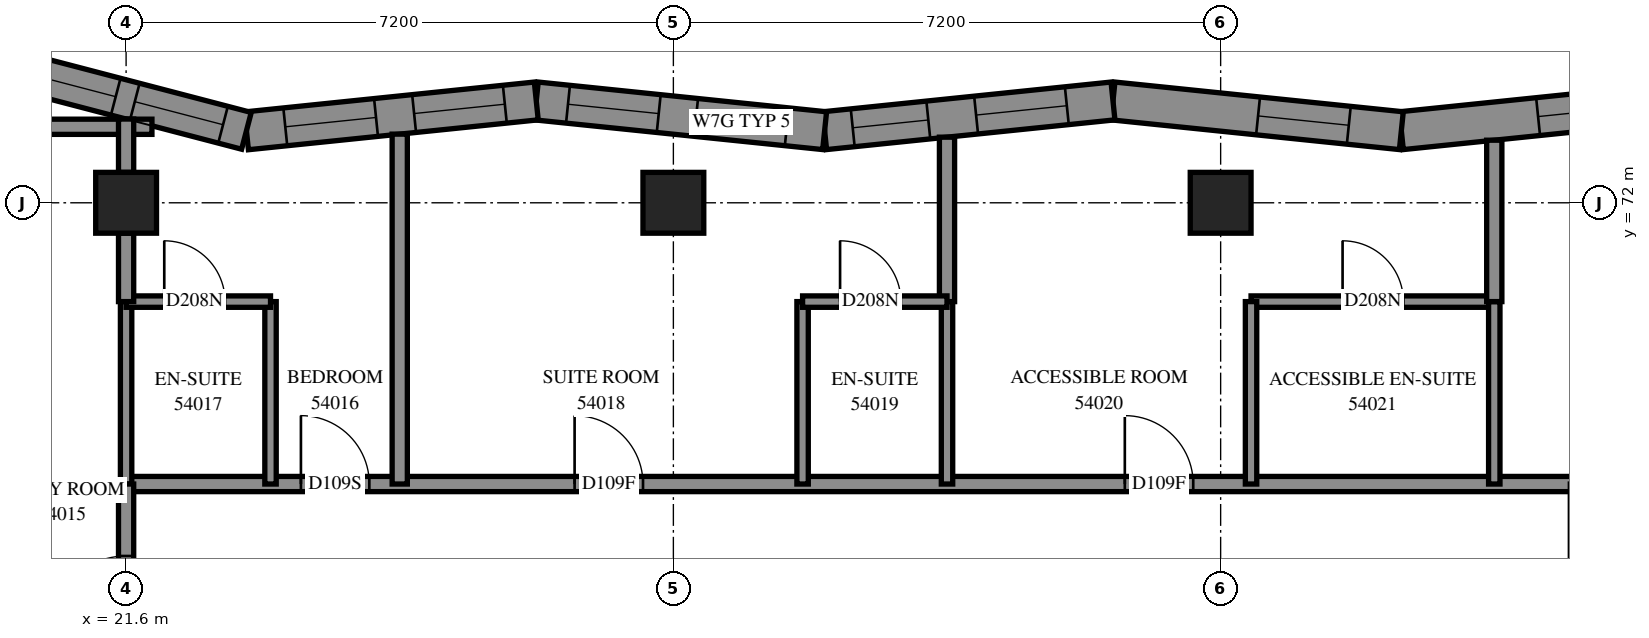
"""IFC4 building model, lengths in metres.
Left out: names, types, materials, properties, quantities, classifications, styles, units other than length and angle.
Written with IfcOpenShell. Run it as: python <this file> out.ifc"""

import sys

from ifc_helpers import new_model, si_unit, direction, frame, frame_2d, origin, origin_2d, place, context, subcontext, project, spatial, polyline, rectangle, outline, extrude, element, fill, save


model = new_model("IFC4")
c1 = context("Model", 3, precision=1e-05, world=origin(), true_north=direction((0.0, 1.0)))
c2 = subcontext(c1, "Body", "Model", "MODEL_VIEW")
j1 = project(units=[si_unit("LENGTHUNIT", "METRE"), si_unit("PLANEANGLEUNIT", "RADIAN")], contexts=[c1])
p1 = place(None, origin())
s1 = spatial("IfcSite", under=j1, at=p1, CompositionType="ELEMENT")
p2 = place(p1, origin())
s2 = spatial("IfcBuilding", under=s1, at=p2, CompositionType="ELEMENT")
p3 = place(p2, frame((0.0, 0.0, 199.8)))
s3 = spatial("IfcBuildingStorey", under=s2, at=p3, CompositionType="ELEMENT", Elevation=199.8)
for number, where, z_axis, x_axis in (
    (1, (21.6, 72.0, 0.0), (0.0, 0.0, 1.0), (1.0, 0.0, 0.0)),
    (2, (28.8, 72.0, 0.0), (0.0, 0.0, 1.0), (1.0, 0.0, 0.0)),
    (3, (36.0, 72.0, 0.0), (0.0, 0.0, 1.0), (1.0, 0.0, 0.0)),
):
    element("IfcColumn", number, at=place(p3, frame(where, z_axis=z_axis, x_axis=x_axis)), inside=s3, PredefinedType="COLUMN", context=c2, shape_type="SweptSolid", body=[
        extrude(rectangle(XDim=0.8, YDim=0.8, at=origin_2d()), origin(), (0.0, 0.0, 1.0), 3.1),
    ])
p4 = place(p3, frame((42.171, 73.34, 0.0), z_axis=(0.0, 0.0, 1.0), x_axis=(-0.9947306832, -0.1025225234, 0.0)))
e4 = element("IfcWall", 4, at=p4, inside=s3, PredefinedType="SOLIDWALL", context=c2, shape_type="SweptSolid", body=[
    extrude(outline(polyline([(-0.026, -0.25), (3.788, -0.25), (3.84, 0.25), (0.026, 0.25), (-0.026, -0.25)])), origin(), (0.0, 0.0, 1.0), 3.1),
])
p5 = place(p4, frame((0.805, 0.0, 0.45)))
e5 = element("IfcOpeningElement", 5, at=p5, cuts=e4, PredefinedType="OPENING", context=c2, shape_type="SweptSolid", body=[
    extrude(rectangle(XDim=1.2, YDim=2.5, at=frame_2d((0.6, 1.25))), frame((0.0, 0.26, 0.0), z_axis=(0.0, -1.0, 0.0), x_axis=(1.0, 0.0, 0.0)), (0.0, 0.0, 1.0), 0.52),
])
p6 = place(p3, frame((38.377, 72.949, 0.0), z_axis=(0.0, 0.0, 1.0), x_axis=(-0.9947306832, 0.1025225234, 0.0)))
e6 = element("IfcWall", 6, at=p6, inside=s3, PredefinedType="SOLIDWALL", context=c2, shape_type="SweptSolid", body=[
    extrude(outline(polyline([(0.026, -0.25), (3.84, -0.25), (3.788, 0.25), (-0.026, 0.25), (0.026, -0.25)])), origin(), (0.0, 0.0, 1.0), 3.1),
])
p7 = place(p6, frame((0.695, 0.0, 0.45)))
e7 = element("IfcOpeningElement", 7, at=p7, cuts=e6, PredefinedType="OPENING", context=c2, shape_type="SweptSolid", body=[
    extrude(rectangle(XDim=1.2, YDim=2.5, at=frame_2d((0.6, 1.25))), frame((0.0, 0.26, 0.0), z_axis=(0.0, -1.0, 0.0), x_axis=(1.0, 0.0, 0.0)), (0.0, 0.0, 1.0), 0.52),
])
p8 = place(p3, frame((34.584, 73.34, 0.0), z_axis=(0.0, 0.0, 1.0), x_axis=(-0.9947304076, -0.1025251975, 0.0)))
e8 = element("IfcWall", 8, at=p8, inside=s3, PredefinedType="SOLIDWALL", context=c2, shape_type="SweptSolid", body=[
    extrude(outline(polyline([(-0.026, -0.25), (3.788, -0.25), (3.84, 0.25), (0.026, 0.25), (-0.026, -0.25)])), origin(), (0.0, 0.0, 1.0), 3.1),
])
p9 = place(p8, frame((0.611, 0.0, 0.45)))
e9 = element("IfcOpeningElement", 9, at=p9, cuts=e8, PredefinedType="OPENING", context=c2, shape_type="SweptSolid", body=[
    extrude(rectangle(XDim=1.2, YDim=2.5, at=frame_2d((0.6, 1.25))), frame((0.0, 0.26, 0.0), z_axis=(0.0, -1.0, 0.0), x_axis=(1.0, 0.0, 0.0)), (0.0, 0.0, 1.0), 0.52),
])
p10 = place(p8, frame((2.442, 0.0, 0.45)))
e10 = element("IfcOpeningElement", 10, at=p10, cuts=e8, PredefinedType="OPENING", context=c2, shape_type="SweptSolid", body=[
    extrude(rectangle(XDim=1.0, YDim=2.5, at=frame_2d((0.5, 1.25))), frame((0.0, 0.26, 0.0), z_axis=(0.0, -1.0, 0.0), x_axis=(1.0, 0.0, 0.0)), (0.0, 0.0, 1.0), 0.52),
])
p11 = place(p3, frame((30.79, 72.949, 0.0), z_axis=(0.0, 0.0, 1.0), x_axis=(-0.9947306832, 0.1025225234, 0.0)))
e11 = element("IfcWall", 11, at=p11, inside=s3, PredefinedType="SOLIDWALL", context=c2, shape_type="SweptSolid", body=[
    extrude(outline(polyline([(0.026, -0.25), (3.84, -0.25), (3.788, 0.25), (-0.026, 0.25), (0.026, -0.25)])), origin(), (0.0, 0.0, 1.0), 2.6),
])
p12 = place(p11, frame((0.5, 0.0, 0.6)))
e12 = element("IfcOpeningElement", 12, at=p12, cuts=e11, PredefinedType="OPENING", context=c2, shape_type="SweptSolid", body=[
    extrude(rectangle(XDim=1.2, YDim=1.9, at=frame_2d((0.6, 0.95))), frame((0.0, 0.26, 0.0), z_axis=(0.0, -1.0, 0.0), x_axis=(1.0, 0.0, 0.0)), (0.0, 0.0, 1.0), 0.52),
])
p13 = place(p11, frame((2.194, 0.0, 0.6)))
e13 = element("IfcOpeningElement", 13, at=p13, cuts=e11, PredefinedType="OPENING", context=c2, shape_type="SweptSolid", body=[
    extrude(rectangle(XDim=1.2, YDim=1.9, at=frame_2d((0.6, 0.95))), frame((0.0, 0.26, 0.0), z_axis=(0.0, -1.0, 0.0), x_axis=(1.0, 0.0, 0.0)), (0.0, 0.0, 1.0), 0.52),
])
p14 = place(p3, frame((26.996, 73.34, 0.0), z_axis=(0.0, 0.0, 1.0), x_axis=(-0.994730395, -0.10252532, 0.0)))
e14 = element("IfcWall", 14, at=p14, inside=s3, PredefinedType="SOLIDWALL", context=c2, shape_type="SweptSolid", body=[
    extrude(outline(polyline([(-0.026, -0.25), (3.788, -0.25), (3.878, 0.25), (0.026, 0.25), (-0.026, -0.25)])), origin(), (0.0, 0.0, 1.0), 2.6),
])
p15 = place(p14, frame((0.416, 0.0, 0.6)))
e15 = element("IfcOpeningElement", 15, at=p15, cuts=e14, PredefinedType="OPENING", context=c2, shape_type="SweptSolid", body=[
    extrude(rectangle(XDim=1.2, YDim=1.9, at=frame_2d((0.6, 0.95))), frame((0.0, 0.26, 0.0), z_axis=(0.0, -1.0, 0.0), x_axis=(1.0, 0.0, 0.0)), (0.0, 0.0, 1.0), 0.52),
])
p16 = place(p14, frame((2.119, 0.0, 0.6)))
e16 = element("IfcOpeningElement", 16, at=p16, cuts=e14, PredefinedType="OPENING", context=c2, shape_type="SweptSolid", body=[
    extrude(rectangle(XDim=1.2, YDim=1.9, at=frame_2d((0.6, 0.95))), frame((0.0, 0.26, 0.0), z_axis=(0.0, -1.0, 0.0), x_axis=(1.0, 0.0, 0.0)), (0.0, 0.0, 1.0), 0.52),
])
p17 = place(p3, frame((23.183, 72.947, 0.0), z_axis=(0.0, 0.0, 1.0), x_axis=(-0.9675355908, 0.2527348026, 0.0)))
e17 = element("IfcWall", 17, at=p17, inside=s3, PredefinedType="SOLIDWALL", context=c2, shape_type="SweptSolid", body=[
    extrude(outline(polyline([(0.045, -0.25), (3.966, -0.25), (3.319, 0.25), (-0.045, 0.25), (0.045, -0.25)])), origin(), (0.0, 0.0, 1.0), 3.1),
])
p18 = place(p17, frame((0.318, 0.0, 0.45)))
e18 = element("IfcOpeningElement", 18, at=p18, cuts=e17, PredefinedType="OPENING", context=c2, shape_type="SweptSolid", body=[
    extrude(rectangle(XDim=1.2, YDim=2.5, at=frame_2d((0.6, 1.25))), frame((0.0, 0.26, 0.0), z_axis=(0.0, -1.0, 0.0), x_axis=(1.0, 0.0, 0.0)), (0.0, 0.0, 1.0), 0.52),
])
p19 = place(p17, frame((1.778, 0.0, 0.45)))
e19 = element("IfcOpeningElement", 19, at=p19, cuts=e17, PredefinedType="OPENING", context=c2, shape_type="SweptSolid", body=[
    extrude(rectangle(XDim=1.2, YDim=2.5, at=frame_2d((0.6, 1.25))), frame((0.0, 0.26, 0.0), z_axis=(0.0, -1.0, 0.0), x_axis=(1.0, 0.0, 0.0)), (0.0, 0.0, 1.0), 0.52),
])
p20 = place(p3, frame((21.6, 68.3, 0.0), z_axis=(0.0, 0.0, 1.0), x_axis=(1.0, 0.0, 0.0)))
e20 = element("IfcWall", 20, at=p20, inside=s3, PredefinedType="PARTITIONING", context=c2, shape_type="SweptSolid", body=[
    extrude(rectangle(XDim=19.1, YDim=0.2, at=frame_2d((9.55, 0.0))), origin(), (0.0, 0.0, 1.0), 3.1),
])
p21 = place(p20, frame((2.3, 0.0, 0.0)))
e21 = element("IfcOpeningElement", 21, at=p21, cuts=e20, PredefinedType="OPENING", context=c2, shape_type="SweptSolid", body=[
    extrude(rectangle(XDim=0.9, YDim=2.1, at=frame_2d((0.45, 1.05))), frame((0.0, 0.11, 0.0), z_axis=(0.0, -1.0, 0.0), x_axis=(1.0, 0.0, 0.0)), (0.0, 0.0, 1.0), 0.22),
])
p22 = place(p20, frame((5.901, 0.0, 0.0)))
e22 = element("IfcOpeningElement", 22, at=p22, cuts=e20, PredefinedType="OPENING", context=c2, shape_type="SweptSolid", body=[
    extrude(rectangle(XDim=0.9, YDim=2.1, at=frame_2d((0.45, 1.05))), frame((0.0, 0.11, 0.0), z_axis=(0.0, -1.0, 0.0), x_axis=(1.0, 0.0, 0.0)), (0.0, 0.0, 1.0), 0.22),
])
p23 = place(p20, frame((13.139, 0.0, 0.0)))
e23 = element("IfcOpeningElement", 23, at=p23, cuts=e20, PredefinedType="OPENING", context=c2, shape_type="SweptSolid", body=[
    extrude(rectangle(XDim=0.9, YDim=2.1, at=frame_2d((0.45, 1.05))), frame((0.0, 0.11, 0.0), z_axis=(0.0, -1.0, 0.0), x_axis=(1.0, 0.0, 0.0)), (0.0, 0.0, 1.0), 0.22),
])
p24 = place(p3, frame((25.2, 68.3, 0.0), z_axis=(0.0, 0.0, 1.0), x_axis=(0.0, 1.0, 0.0)))
e24 = element("IfcWall", 24, at=p24, inside=s3, PredefinedType="PARTITIONING", context=c2, shape_type="SweptSolid", body=[
    extrude(rectangle(XDim=4.603, YDim=0.2, at=frame_2d((2.302, 0.0))), origin(), (0.0, 0.0, 1.0), 3.1),
])
p25 = place(p3, frame((36.4, 70.7, 0.0), z_axis=(0.0, 0.0, 1.0), x_axis=(1.0, 0.0, 0.0)))
e25 = element("IfcWall", 25, at=p25, inside=s3, PredefinedType="PARTITIONING", context=c2, shape_type="SweptSolid", body=[
    extrude(rectangle(XDim=3.2, YDim=0.15, at=frame_2d((1.6, 0.0))), origin(), (0.0, 0.0, 1.0), 3.1),
])
p26 = place(p25, frame((1.204, 0.0, 0.0)))
e26 = element("IfcOpeningElement", 26, at=p26, cuts=e25, PredefinedType="OPENING", context=c2, shape_type="SweptSolid", body=[
    extrude(rectangle(XDim=0.8, YDim=2.1, at=frame_2d((0.4, 1.05))), frame((0.0, 0.085, 0.0), z_axis=(0.0, -1.0, 0.0), x_axis=(1.0, 0.0, 0.0)), (0.0, 0.0, 1.0), 0.17),
])
p27 = place(p3, frame((21.6, 68.3, 0.0), z_axis=(0.0, 0.0, 1.0), x_axis=(0.0, 1.0, 0.0)))
e27 = element("IfcWall", 27, at=p27, inside=s3, PredefinedType="PARTITIONING", context=c2, shape_type="SweptSolid", body=[
    extrude(rectangle(XDim=2.4, YDim=0.15, at=frame_2d((1.2, 0.0))), origin(), (0.0, 0.0, 1.0), 2.6),
])
for number, where, z_axis, x_axis in (
    (28, (23.5, 68.3, 0.0), (0.0, 0.0, 1.0), (0.0, 1.0, 0.0)),
    (29, (30.5, 68.3, 0.0), (0.0, 0.0, 1.0), (0.0, 1.0, 0.0)),
    (30, (32.4, 68.3, 0.0), (0.0, 0.0, 1.0), (0.0, 1.0, 0.0)),
    (31, (36.4, 68.3, 0.0), (0.0, 0.0, 1.0), (0.0, 1.0, 0.0)),
    (32, (39.6, 68.3, 0.0), (0.0, 0.0, 1.0), (0.0, 1.0, 0.0)),
):
    element("IfcWall", number, at=place(p3, frame(where, z_axis=z_axis, x_axis=x_axis)), inside=s3, PredefinedType="PARTITIONING", context=c2, shape_type="SweptSolid", body=[
        extrude(rectangle(XDim=2.4, YDim=0.15, at=frame_2d((1.2, 0.0))), origin(), (0.0, 0.0, 1.0), 3.1),
    ])
p28 = place(p3, frame((21.6, 66.1, 0.0), z_axis=(0.0, 0.0, 1.0), x_axis=(0.0, 1.0, 0.0)))
e33 = element("IfcWall", 33, at=p28, inside=s3, PredefinedType="PARTITIONING", context=c2, shape_type="SweptSolid", body=[
    extrude(rectangle(XDim=2.2, YDim=0.2, at=frame_2d((1.1, 0.0))), origin(), (0.0, 0.0, 1.0), 2.6),
])
p29 = place(p28, frame((0.253, 0.0, 0.0)))
e34 = element("IfcOpeningElement", 34, at=p29, cuts=e33, PredefinedType="OPENING", context=c2, shape_type="SweptSolid", body=[
    extrude(rectangle(XDim=1.0, YDim=2.1, at=frame_2d((0.5, 1.05))), frame((0.0, 0.11, 0.0), z_axis=(0.0, -1.0, 0.0), x_axis=(1.0, 0.0, 0.0)), (0.0, 0.0, 1.0), 0.22),
])
p30 = place(p3, frame((32.4, 70.7, 0.0), z_axis=(0.0, 0.0, 1.0), x_axis=(0.0, 1.0, 0.0)))
e35 = element("IfcWall", 35, at=p30, inside=s3, PredefinedType="PARTITIONING", context=c2, shape_type="SweptSolid", body=[
    extrude(rectangle(XDim=2.163, YDim=0.2, at=frame_2d((1.082, 0.0))), origin(), (0.0, 0.0, 1.0), 3.1),
])
p31 = place(p3, frame((39.6, 70.7, 0.0), z_axis=(0.0, 0.0, 1.0), x_axis=(0.0, 1.0, 0.0)))
e36 = element("IfcWall", 36, at=p31, inside=s3, PredefinedType="PARTITIONING", context=c2, shape_type="SweptSolid", body=[
    extrude(rectangle(XDim=2.123, YDim=0.2, at=frame_2d((1.062, 0.0))), origin(), (0.0, 0.0, 1.0), 3.1),
])
p32 = place(p3, frame((19.909, 73.0, 0.0), z_axis=(0.0, 0.0, 1.0), x_axis=(1.0, 0.0, 0.0)))
e37 = element("IfcWall", 37, at=p32, inside=s3, PredefinedType="PARTITIONING", context=c2, shape_type="SweptSolid", body=[
    extrude(rectangle(XDim=2.031, YDim=0.2, at=frame_2d((1.016, 0.0))), origin(), (0.0, 0.0, 1.0), 3.1),
])
p33 = place(p3, frame((21.6, 70.7, 0.0), z_axis=(0.0, 0.0, 1.0), x_axis=(1.0, 0.0, 0.0)))
e38 = element("IfcWall", 38, at=p33, inside=s3, PredefinedType="PARTITIONING", context=c2, shape_type="SweptSolid", body=[
    extrude(rectangle(XDim=1.9, YDim=0.15, at=frame_2d((0.95, 0.0))), origin(), (0.0, 0.0, 1.0), 3.1),
])
p34 = place(p33, frame((0.502, 0.0, 0.0)))
e39 = element("IfcOpeningElement", 39, at=p34, cuts=e38, PredefinedType="OPENING", context=c2, shape_type="SweptSolid", body=[
    extrude(rectangle(XDim=0.8, YDim=2.1, at=frame_2d((0.4, 1.05))), frame((0.0, 0.085, 0.0), z_axis=(0.0, -1.0, 0.0), x_axis=(1.0, 0.0, 0.0)), (0.0, 0.0, 1.0), 0.17),
])
p35 = place(p3, frame((30.5, 70.7, 0.0), z_axis=(0.0, 0.0, 1.0), x_axis=(1.0, 0.0, 0.0)))
e40 = element("IfcWall", 40, at=p35, inside=s3, PredefinedType="PARTITIONING", context=c2, shape_type="SweptSolid", body=[
    extrude(rectangle(XDim=1.9, YDim=0.15, at=frame_2d((0.95, 0.0))), origin(), (0.0, 0.0, 1.0), 3.1),
])
p36 = place(p35, frame((0.493, 0.0, 0.0)))
e41 = element("IfcOpeningElement", 41, at=p36, cuts=e40, PredefinedType="OPENING", context=c2, shape_type="SweptSolid", body=[
    extrude(rectangle(XDim=0.8, YDim=2.1, at=frame_2d((0.4, 1.05))), frame((0.0, 0.085, 0.0), z_axis=(0.0, -1.0, 0.0), x_axis=(1.0, 0.0, 0.0)), (0.0, 0.0, 1.0), 0.17),
])
p37 = place(p3, frame((21.6, 70.7, 0.0), z_axis=(0.0, 0.0, 1.0), x_axis=(0.0, 1.0, 0.0)))
e42 = element("IfcWall", 42, at=p37, inside=s3, PredefinedType="PARTITIONING", context=c2, shape_type="SweptSolid", body=[
    extrude(rectangle(XDim=0.9, YDim=0.2, at=frame_2d((0.45, 0.0))), origin(), (0.0, 0.0, 1.0), 2.6),
])
p38 = place(p3, frame((21.6, 72.4, 0.0), z_axis=(0.0, 0.0, 1.0), x_axis=(0.0, 1.0, 0.0)))
e43 = element("IfcWall", 43, at=p38, inside=s3, PredefinedType="PARTITIONING", context=c2, shape_type="SweptSolid", body=[
    extrude(rectangle(XDim=0.702, YDim=0.2, at=frame_2d((0.351, 0.0))), origin(), (0.0, 0.0, 1.0), 3.1),
])
p39 = place(p5, origin())
e44 = element("IfcWindow", 44, at=p39, inside=s3, PartitioningType="SINGLE_PANEL", PredefinedType="WINDOW", context=c2, shape_type="SweptSolid", body=[
    extrude(rectangle(XDim=1.2, YDim=2.5, at=frame_2d((0.6, 1.25))), frame((0.0, 0.18, 0.0), z_axis=(0.0, -1.0, 0.0), x_axis=(1.0, 0.0, 0.0)), (0.0, 0.0, 1.0), 0.06),
])
fill(e5, e44)
p40 = place(p7, origin())
e45 = element("IfcWindow", 45, at=p40, inside=s3, PartitioningType="SINGLE_PANEL", PredefinedType="WINDOW", context=c2, shape_type="SweptSolid", body=[
    extrude(rectangle(XDim=1.2, YDim=2.5, at=frame_2d((0.6, 1.25))), frame((0.0, 0.18, 0.0), z_axis=(0.0, -1.0, 0.0), x_axis=(1.0, 0.0, 0.0)), (0.0, 0.0, 1.0), 0.06),
])
fill(e7, e45)
p41 = place(p9, origin())
e46 = element("IfcWindow", 46, at=p41, inside=s3, PartitioningType="SINGLE_PANEL", PredefinedType="WINDOW", context=c2, shape_type="SweptSolid", body=[
    extrude(rectangle(XDim=1.2, YDim=2.5, at=frame_2d((0.6, 1.25))), frame((0.0, 0.18, 0.0), z_axis=(0.0, -1.0, 0.0), x_axis=(1.0, 0.0, 0.0)), (0.0, 0.0, 1.0), 0.06),
])
fill(e9, e46)
p42 = place(p12, origin())
e47 = element("IfcWindow", 47, at=p42, inside=s3, PartitioningType="SINGLE_PANEL", PredefinedType="WINDOW", context=c2, shape_type="SweptSolid", body=[
    extrude(rectangle(XDim=1.2, YDim=1.9, at=frame_2d((0.6, 0.95))), frame((0.0, 0.18, 0.0), z_axis=(0.0, -1.0, 0.0), x_axis=(1.0, 0.0, 0.0)), (0.0, 0.0, 1.0), 0.06),
])
fill(e12, e47)
p43 = place(p13, origin())
e48 = element("IfcWindow", 48, at=p43, inside=s3, PartitioningType="SINGLE_PANEL", PredefinedType="WINDOW", context=c2, shape_type="SweptSolid", body=[
    extrude(rectangle(XDim=1.2, YDim=1.9, at=frame_2d((0.6, 0.95))), frame((0.0, 0.18, 0.0), z_axis=(0.0, -1.0, 0.0), x_axis=(1.0, 0.0, 0.0)), (0.0, 0.0, 1.0), 0.06),
])
fill(e13, e48)
p44 = place(p15, origin())
e49 = element("IfcWindow", 49, at=p44, inside=s3, PartitioningType="SINGLE_PANEL", PredefinedType="WINDOW", context=c2, shape_type="SweptSolid", body=[
    extrude(rectangle(XDim=1.2, YDim=1.9, at=frame_2d((0.6, 0.95))), frame((0.0, 0.18, 0.0), z_axis=(0.0, -1.0, 0.0), x_axis=(1.0, 0.0, 0.0)), (0.0, 0.0, 1.0), 0.06),
])
fill(e15, e49)
p45 = place(p16, origin())
e50 = element("IfcWindow", 50, at=p45, inside=s3, PartitioningType="SINGLE_PANEL", PredefinedType="WINDOW", context=c2, shape_type="SweptSolid", body=[
    extrude(rectangle(XDim=1.2, YDim=1.9, at=frame_2d((0.6, 0.95))), frame((0.0, 0.18, 0.0), z_axis=(0.0, -1.0, 0.0), x_axis=(1.0, 0.0, 0.0)), (0.0, 0.0, 1.0), 0.06),
])
fill(e16, e50)
p46 = place(p18, origin())
e51 = element("IfcWindow", 51, at=p46, inside=s3, PartitioningType="SINGLE_PANEL", PredefinedType="WINDOW", context=c2, shape_type="SweptSolid", body=[
    extrude(rectangle(XDim=1.2, YDim=2.5, at=frame_2d((0.6, 1.25))), frame((0.0, 0.13, 0.0), z_axis=(0.0, -1.0, 0.0), x_axis=(1.0, 0.0, 0.0)), (0.0, 0.0, 1.0), 0.06),
])
fill(e18, e51)
p47 = place(p19, origin())
e52 = element("IfcWindow", 52, at=p47, inside=s3, PartitioningType="SINGLE_PANEL", PredefinedType="WINDOW", context=c2, shape_type="SweptSolid", body=[
    extrude(rectangle(XDim=1.2, YDim=2.5, at=frame_2d((0.6, 1.25))), frame((0.0, 0.18, 0.0), z_axis=(0.0, -1.0, 0.0), x_axis=(1.0, 0.0, 0.0)), (0.0, 0.0, 1.0), 0.06),
])
fill(e19, e52)
p48 = place(p29, origin())
e53 = element("IfcDoor", 53, at=p48, inside=s3, OperationType="SINGLE_SWING_RIGHT", PredefinedType="DOOR", context=c2, shape_type="SweptSolid", body=[
    extrude(rectangle(XDim=1.0, YDim=2.1, at=frame_2d((0.5, 1.05))), frame((0.0, 0.025, 0.0), z_axis=(0.0, -1.0, 0.0), x_axis=(1.0, 0.0, 0.0)), (0.0, 0.0, 1.0), 0.05),
])
fill(e34, e53)
p49 = place(p21, origin())
e54 = element("IfcDoor", 54, at=p49, inside=s3, OperationType="SINGLE_SWING_RIGHT", PredefinedType="DOOR", context=c2, shape_type="SweptSolid", body=[
    extrude(rectangle(XDim=0.9, YDim=2.1, at=frame_2d((0.45, 1.05))), frame((0.0, 0.025, 0.0), z_axis=(0.0, -1.0, 0.0), x_axis=(1.0, 0.0, 0.0)), (0.0, 0.0, 1.0), 0.05),
])
fill(e21, e54)
p50 = place(p34, origin())
e55 = element("IfcDoor", 55, at=p50, inside=s3, OperationType="SINGLE_SWING_RIGHT", PredefinedType="DOOR", context=c2, shape_type="SweptSolid", body=[
    extrude(rectangle(XDim=0.8, YDim=2.1, at=frame_2d((0.4, 1.05))), frame((0.0, 0.025, 0.0), z_axis=(0.0, -1.0, 0.0), x_axis=(1.0, 0.0, 0.0)), (0.0, 0.0, 1.0), 0.05),
])
fill(e39, e55)
p51 = place(p22, origin())
e56 = element("IfcDoor", 56, at=p51, inside=s3, OperationType="SINGLE_SWING_LEFT", PredefinedType="DOOR", context=c2, shape_type="SweptSolid", body=[
    extrude(rectangle(XDim=0.9, YDim=2.1, at=frame_2d((0.45, 1.05))), frame((0.0, 0.025, 0.0), z_axis=(0.0, -1.0, 0.0), x_axis=(1.0, 0.0, 0.0)), (0.0, 0.0, 1.0), 0.05),
])
fill(e22, e56)
p52 = place(p36, origin())
e57 = element("IfcDoor", 57, at=p52, inside=s3, OperationType="SINGLE_SWING_RIGHT", PredefinedType="DOOR", context=c2, shape_type="SweptSolid", body=[
    extrude(rectangle(XDim=0.8, YDim=2.1, at=frame_2d((0.4, 1.05))), frame((0.0, 0.025, 0.0), z_axis=(0.0, -1.0, 0.0), x_axis=(1.0, 0.0, 0.0)), (0.0, 0.0, 1.0), 0.05),
])
fill(e41, e57)
p53 = place(p23, origin())
e58 = element("IfcDoor", 58, at=p53, inside=s3, OperationType="SINGLE_SWING_LEFT", PredefinedType="DOOR", context=c2, shape_type="SweptSolid", body=[
    extrude(rectangle(XDim=0.9, YDim=2.1, at=frame_2d((0.45, 1.05))), frame((0.0, 0.025, 0.0), z_axis=(0.0, -1.0, 0.0), x_axis=(1.0, 0.0, 0.0)), (0.0, 0.0, 1.0), 0.05),
])
fill(e23, e58)
p54 = place(p26, origin())
e59 = element("IfcDoor", 59, at=p54, inside=s3, OperationType="SINGLE_SWING_RIGHT", PredefinedType="DOOR", context=c2, shape_type="SweptSolid", body=[
    extrude(rectangle(XDim=0.8, YDim=2.1, at=frame_2d((0.4, 1.05))), frame((0.0, 0.025, 0.0), z_axis=(0.0, -1.0, 0.0), x_axis=(1.0, 0.0, 0.0)), (0.0, 0.0, 1.0), 0.05),
])
fill(e26, e59)
p55 = place(p10, origin())
e60 = element("IfcWindow", 60, at=p55, inside=s3, PartitioningType="SINGLE_PANEL", PredefinedType="WINDOW", context=c2, shape_type="SweptSolid", body=[
    extrude(rectangle(XDim=1.0, YDim=2.5, at=frame_2d((0.5, 1.25))), frame((0.0, 0.18, 0.0), z_axis=(0.0, -1.0, 0.0), x_axis=(1.0, 0.0, 0.0)), (0.0, 0.0, 1.0), 0.06),
])
fill(e10, e60)
save(model, sys.argv[1])
